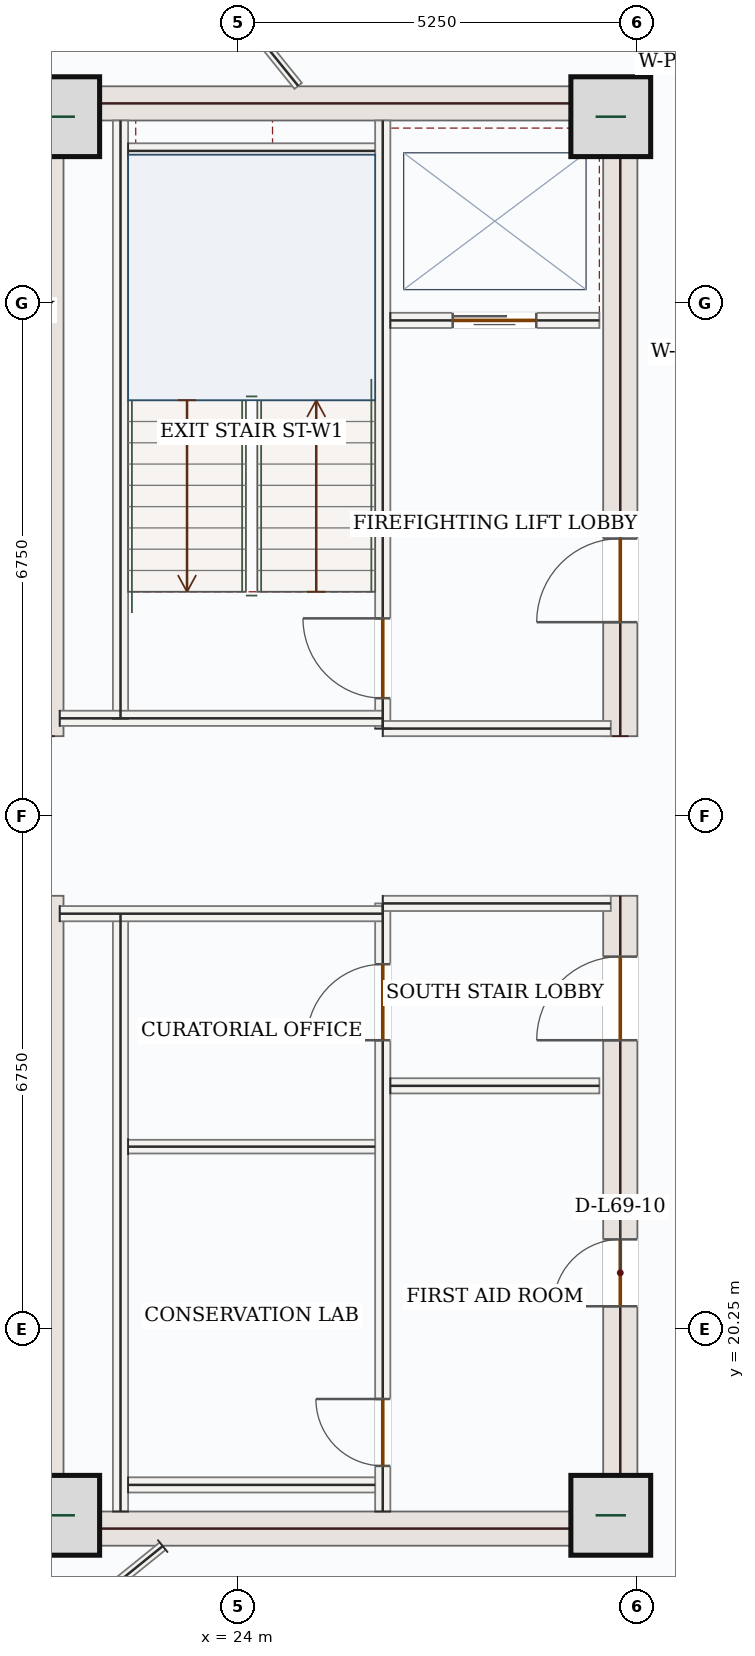
"""IFC4 building model, lengths in metres.
Left out: names, types, materials, properties, quantities, classifications, styles, units other than length and angle.
Written with IfcOpenShell. Run it as: python <this file> out.ifc"""

import sys

from ifc_helpers import new_model, si_unit, direction, frame, frame_2d, origin, origin_2d, place, context, subcontext, project, spatial, rectangle, extrude, source, transform, mapped, element, fill, save


model = new_model("IFC4")
c1 = context("Model", 3, precision=1e-05, world=origin(), true_north=direction((0.0, 1.0)))
c2 = subcontext(c1, "Body", "Model", "MODEL_VIEW")
j1 = project(units=[si_unit("LENGTHUNIT", "METRE"), si_unit("PLANEANGLEUNIT", "RADIAN")], contexts=[c1])
p1 = place(None, origin())
s1 = spatial("IfcSite", under=j1, at=p1, CompositionType="ELEMENT")
p2 = place(p1, origin())
s2 = spatial("IfcBuilding", under=s1, at=p2, CompositionType="ELEMENT")
p3 = place(p2, frame((0.0, 0.0, 287.85)))
s3 = spatial("IfcBuildingStorey", under=s2, at=p3, CompositionType="ELEMENT", Elevation=287.85)
m1 = source(origin(), c2, "Body", "SweptSolid", [
    extrude(rectangle(XDim=8.55, YDim=0.45, at=frame_2d((4.275, 0.0))), origin(), (0.0, 0.0, 1.0), 3.5),
])
for number, where, z_axis, x_axis in (
    (1, (21.475, 17.4, 0.0), (0.0, 0.0, 1.0), (0.0, 1.0, 0.0)),
    (2, (21.475, 28.05, 0.0), (0.0, 0.0, 1.0), (0.0, 1.0, 0.0)),
):
    element("IfcWall", number, at=place(p3, frame(where, z_axis=z_axis, x_axis=x_axis)), inside=s3, PredefinedType="SHEAR", context=c2, shape_type="MappedRepresentation", body=[
        mapped(m1, transform((0.0, 0.0, 0.0), x_axis=(1.0, 0.0, 0.0), y_axis=(0.0, 1.0, 0.0), z_axis=(0.0, 0.0, 1.0), scale=1.0)),
    ])
p4 = place(p3, frame((29.025, 17.4, 0.0), z_axis=(0.0, 0.0, 1.0), x_axis=(0.0, 1.0, 0.0)))
e3 = element("IfcWall", 3, at=p4, inside=s3, PredefinedType="SHEAR", context=c2, shape_type="SweptSolid", body=[
    extrude(rectangle(XDim=8.55, YDim=0.45, at=frame_2d((4.275, 0.0))), origin(), (0.0, 0.0, 1.0), 3.5),
])
p5 = place(p4, frame((6.65, 0.0, 0.0)))
e4 = element("IfcOpeningElement", 4, at=p5, cuts=e3, PredefinedType="OPENING", context=c2, shape_type="SweptSolid", body=[
    extrude(rectangle(XDim=1.1, YDim=2.2, at=frame_2d((0.55, 1.1))), frame((0.0, 0.235, 0.0), z_axis=(0.0, -1.0, 0.0), x_axis=(1.0, 0.0, 0.0)), (0.0, 0.0, 1.0), 0.47),
])
p6 = place(p4, frame((3.15, 0.0, 0.0)))
e5 = element("IfcOpeningElement", 5, at=p6, cuts=e3, PredefinedType="OPENING", context=c2, shape_type="SweptSolid", body=[
    extrude(rectangle(XDim=0.88, YDim=2.1, at=frame_2d((0.44, 1.05))), frame((0.0, 0.235, 0.0), z_axis=(0.0, -1.0, 0.0), x_axis=(1.0, 0.0, 0.0)), (0.0, 0.0, 1.0), 0.47),
])
p7 = place(p3, frame((29.025, 28.05, 0.0), z_axis=(0.0, 0.0, 1.0), x_axis=(0.0, 1.0, 0.0)))
e6 = element("IfcWall", 6, at=p7, inside=s3, PredefinedType="SHEAR", context=c2, shape_type="SweptSolid", body=[
    extrude(rectangle(XDim=8.55, YDim=0.45, at=frame_2d((4.275, 0.0))), origin(), (0.0, 0.0, 1.0), 3.5),
])
p8 = place(p7, frame((1.5, 0.0, 0.0)))
e7 = element("IfcOpeningElement", 7, at=p8, cuts=e6, PredefinedType="OPENING", context=c2, shape_type="SweptSolid", body=[
    extrude(rectangle(XDim=1.1, YDim=2.2, at=frame_2d((0.55, 1.1))), frame((0.0, 0.235, 0.0), z_axis=(0.0, -1.0, 0.0), x_axis=(1.0, 0.0, 0.0)), (0.0, 0.0, 1.0), 0.47),
])
m2 = source(origin(), c2, "Body", "SweptSolid", [
    extrude(rectangle(XDim=7.1, YDim=0.45, at=frame_2d((3.55, 0.0))), origin(), (0.0, 0.0, 1.0), 3.5),
])
for number, where, z_axis, x_axis in (
    (8, (21.7, 17.625, 0.0), (0.0, 0.0, 1.0), (1.0, 0.0, 0.0)),
    (9, (21.7, 36.375, 0.0), (0.0, 0.0, 1.0), (1.0, 0.0, 0.0)),
):
    element("IfcWall", number, at=place(p3, frame(where, z_axis=z_axis, x_axis=x_axis)), inside=s3, PredefinedType="SHEAR", context=c2, shape_type="MappedRepresentation", body=[
        mapped(m2, transform((0.0, 0.0, 0.0), x_axis=(1.0, 0.0, 0.0), y_axis=(0.0, 1.0, 0.0), z_axis=(0.0, 0.0, 1.0), scale=1.0)),
    ])
m3 = source(origin(), c2, "Body", "SweptSolid", [
    extrude(rectangle(XDim=1.05, YDim=1.05, at=origin_2d()), origin(), (0.0, 0.0, 1.0), 3.75),
])
for number, where, z_axis, x_axis in (
    (10, (21.65, 17.8, 0.0), (0.0, 0.0, 1.0), (1.0, 0.0, 0.0)),
    (11, (28.9, 17.8, 0.0), (0.0, 0.0, 1.0), (1.0, 0.0, 0.0)),
    (12, (21.65, 36.2, 0.0), (0.0, 0.0, 1.0), (1.0, 0.0, 0.0)),
    (13, (28.9, 36.2, 0.0), (0.0, 0.0, 1.0), (1.0, 0.0, 0.0)),
):
    element("IfcColumn", number, at=place(p3, frame(where, z_axis=z_axis, x_axis=x_axis)), inside=s3, PredefinedType="COLUMN", context=c2, shape_type="MappedRepresentation", body=[
        mapped(m3, transform((0.0, 0.0, 0.0), x_axis=(1.0, 0.0, 0.0), y_axis=(0.0, 1.0, 0.0), z_axis=(0.0, 0.0, 1.0), scale=1.0)),
    ])
m4 = source(origin(), c2, "Body", "SweptSolid", [
    extrude(rectangle(XDim=3.96, YDim=0.28, at=frame_2d((1.98, 0.0))), origin(), (0.0, 0.0, 1.0), 3.5),
])
p9 = place(p3, frame((21.74, 15.658, 0.0), z_axis=(0.0, 0.0, 1.0), x_axis=(-0.707106781187, 0.707106781187, 0.0)))
e14 = element("IfcWall", 14, at=p9, inside=s3, PredefinedType="SOLIDWALL", context=c2, shape_type="MappedRepresentation", body=[
    mapped(m4, transform((0.0, 0.0, 0.0), x_axis=(1.0, 0.0, 0.0), y_axis=(0.0, 1.0, 0.0), z_axis=(0.0, 0.0, 1.0), scale=1.0)),
])
m5 = source(origin(), c2, "Body", "SweptSolid", [
    extrude(rectangle(XDim=7.87, YDim=0.2, at=frame_2d((3.935, 0.0))), origin(), (0.0, 0.0, 1.0), 3.5),
])
for number, where, z_axis, x_axis in (
    (15, (22.45, 17.85, 0.0), (0.0, 0.0, 1.0), (0.0, 1.0, 0.0)),
    (16, (22.45, 28.28, 0.0), (0.0, 0.0, 1.0), (0.0, 1.0, 0.0)),
):
    element("IfcWall", number, at=place(p3, frame(where, z_axis=z_axis, x_axis=x_axis)), inside=s3, PredefinedType="SOLIDWALL", context=c2, shape_type="MappedRepresentation", body=[
        mapped(m5, transform((0.0, 0.0, 0.0), x_axis=(1.0, 0.0, 0.0), y_axis=(0.0, 1.0, 0.0), z_axis=(0.0, 0.0, 1.0), scale=1.0)),
    ])
p10 = place(p3, frame((25.9, 17.85, 0.0), z_axis=(0.0, 0.0, 1.0), x_axis=(0.0, 1.0, 0.0)))
e17 = element("IfcWall", 17, at=p10, inside=s3, PredefinedType="SOLIDWALL", context=c2, shape_type="SweptSolid", body=[
    extrude(rectangle(XDim=8.0, YDim=0.2, at=frame_2d((4.0, 0.0))), origin(), (0.0, 0.0, 1.0), 3.5),
])
p11 = place(p10, frame((6.2, 0.0, 0.0)))
e18 = element("IfcOpeningElement", 18, at=p11, cuts=e17, PredefinedType="OPENING", context=c2, shape_type="SweptSolid", body=[
    extrude(rectangle(XDim=1.0, YDim=2.15, at=frame_2d((0.5, 1.075))), frame((0.0, 0.11, 0.0), z_axis=(0.0, -1.0, 0.0), x_axis=(1.0, 0.0, 0.0)), (0.0, 0.0, 1.0), 0.22),
])
p12 = place(p10, frame((0.6, 0.0, 0.0)))
e19 = element("IfcOpeningElement", 19, at=p12, cuts=e17, PredefinedType="OPENING", context=c2, shape_type="SweptSolid", body=[
    extrude(rectangle(XDim=0.88, YDim=2.1, at=frame_2d((0.44, 1.05))), frame((0.0, 0.11, 0.0), z_axis=(0.0, -1.0, 0.0), x_axis=(1.0, 0.0, 0.0)), (0.0, 0.0, 1.0), 0.22),
])
p13 = place(p3, frame((25.9, 28.15, 0.0), z_axis=(0.0, 0.0, 1.0), x_axis=(0.0, 1.0, 0.0)))
e20 = element("IfcWall", 20, at=p13, inside=s3, PredefinedType="SOLIDWALL", context=c2, shape_type="SweptSolid", body=[
    extrude(rectangle(XDim=8.0, YDim=0.2, at=frame_2d((4.0, 0.0))), origin(), (0.0, 0.0, 1.0), 3.5),
])
p14 = place(p13, frame((0.4, 0.0, 0.0)))
e21 = element("IfcOpeningElement", 21, at=p14, cuts=e20, PredefinedType="OPENING", context=c2, shape_type="SweptSolid", body=[
    extrude(rectangle(XDim=1.05, YDim=2.15, at=frame_2d((0.525, 1.075))), frame((0.0, 0.11, 0.0), z_axis=(0.0, -1.0, 0.0), x_axis=(1.0, 0.0, 0.0)), (0.0, 0.0, 1.0), 0.22),
])
m6 = source(origin(), c2, "Body", "SweptSolid", [
    extrude(rectangle(XDim=4.25, YDim=0.2, at=frame_2d((2.125, 0.0))), origin(), (0.0, 0.0, 1.0), 3.5),
])
p15 = place(p3, frame((21.65, 25.715, 0.0), z_axis=(0.0, 0.0, 1.0), x_axis=(1.0, 0.0, 0.0)))
e22 = element("IfcWall", 22, at=p15, inside=s3, PredefinedType="SOLIDWALL", context=c2, shape_type="MappedRepresentation", body=[
    mapped(m6, transform((0.0, 0.0, 0.0), x_axis=(1.0, 0.0, 0.0), y_axis=(0.0, 1.0, 0.0), z_axis=(0.0, 0.0, 1.0), scale=1.0)),
])
m7 = source(origin(), c2, "Body", "SweptSolid", [
    extrude(rectangle(XDim=3.0, YDim=0.2, at=frame_2d((1.5, 0.0))), origin(), (0.0, 0.0, 1.0), 3.5),
])
p16 = place(p3, frame((25.9, 25.85, 0.0), z_axis=(0.0, 0.0, 1.0), x_axis=(1.0, 0.0, 0.0)))
e23 = element("IfcWall", 23, at=p16, inside=s3, PredefinedType="SOLIDWALL", context=c2, shape_type="MappedRepresentation", body=[
    mapped(m7, transform((0.0, 0.0, 0.0), x_axis=(1.0, 0.0, 0.0), y_axis=(0.0, 1.0, 0.0), z_axis=(0.0, 0.0, 1.0), scale=1.0)),
])
p17 = place(p3, frame((21.65, 28.285, 0.0), z_axis=(0.0, 0.0, 1.0), x_axis=(1.0, 0.0, 0.0)))
e24 = element("IfcWall", 24, at=p17, inside=s3, PredefinedType="SOLIDWALL", context=c2, shape_type="MappedRepresentation", body=[
    mapped(m6, transform((0.0, 0.0, 0.0), x_axis=(1.0, 0.0, 0.0), y_axis=(0.0, 1.0, 0.0), z_axis=(0.0, 0.0, 1.0), scale=1.0)),
])
p18 = place(p3, frame((25.9, 28.15, 0.0), z_axis=(0.0, 0.0, 1.0), x_axis=(1.0, 0.0, 0.0)))
e25 = element("IfcWall", 25, at=p18, inside=s3, PredefinedType="SOLIDWALL", context=c2, shape_type="MappedRepresentation", body=[
    mapped(m7, transform((0.0, 0.0, 0.0), x_axis=(1.0, 0.0, 0.0), y_axis=(0.0, 1.0, 0.0), z_axis=(0.0, 0.0, 1.0), scale=1.0)),
])
m8 = source(origin(), c2, "Body", "SweptSolid", [
    extrude(rectangle(XDim=3.25, YDim=0.2, at=frame_2d((1.625, 0.0))), origin(), (0.0, 0.0, 1.0), 3.5),
])
for number, where, z_axis, x_axis in (
    (26, (22.55, 35.75, 0.0), (0.0, 0.0, 1.0), (1.0, 0.0, 0.0)),
    (27, (22.55, 18.2, 0.0), (0.0, 0.0, 1.0), (1.0, 0.0, 0.0)),
):
    element("IfcWall", number, at=place(p3, frame(where, z_axis=z_axis, x_axis=x_axis)), inside=s3, PredefinedType="SOLIDWALL", context=c2, shape_type="MappedRepresentation", body=[
        mapped(m8, transform((0.0, 0.0, 0.0), x_axis=(1.0, 0.0, 0.0), y_axis=(0.0, 1.0, 0.0), z_axis=(0.0, 0.0, 1.0), scale=1.0)),
    ])
m9 = source(origin(), c2, "Body", "SweptSolid", [
    extrude(rectangle(XDim=3.25, YDim=0.18, at=frame_2d((1.625, 0.0))), origin(), (0.0, 0.0, 1.0), 3.5),
])
p19 = place(p3, frame((22.55, 22.65, 0.0), z_axis=(0.0, 0.0, 1.0), x_axis=(1.0, 0.0, 0.0)))
e28 = element("IfcWall", 28, at=p19, inside=s3, PredefinedType="PARTITIONING", context=c2, shape_type="MappedRepresentation", body=[
    mapped(m9, transform((0.0, 0.0, 0.0), x_axis=(1.0, 0.0, 0.0), y_axis=(0.0, 1.0, 0.0), z_axis=(0.0, 0.0, 1.0), scale=1.0)),
])
p20 = place(p3, frame((26.0, 33.52, 0.0), z_axis=(0.0, 0.0, 1.0), x_axis=(1.0, 0.0, 0.0)))
e29 = element("IfcWall", 29, at=p20, inside=s3, PredefinedType="SOLIDWALL", context=c2, shape_type="SweptSolid", body=[
    extrude(rectangle(XDim=2.75, YDim=0.2, at=frame_2d((1.375, 0.0))), origin(), (0.0, 0.0, 1.0), 3.5),
])
p21 = place(p20, frame((0.82, 0.0, 0.0)))
e30 = element("IfcOpeningElement", 30, at=p21, cuts=e29, PredefinedType="OPENING", context=c2, shape_type="SweptSolid", body=[
    extrude(rectangle(XDim=1.1, YDim=2.15, at=frame_2d((0.55, 1.075))), frame((0.0, 0.11, 0.0), z_axis=(0.0, -1.0, 0.0), x_axis=(1.0, 0.0, 0.0)), (0.0, 0.0, 1.0), 0.22),
])
m10 = source(origin(), c2, "Body", "SweptSolid", [
    extrude(rectangle(XDim=2.75, YDim=0.2, at=frame_2d((1.375, 0.0))), origin(), (0.0, 0.0, 1.0), 3.5),
])
p22 = place(p3, frame((26.0, 23.45, 0.0), z_axis=(0.0, 0.0, 1.0), x_axis=(1.0, 0.0, 0.0)))
e31 = element("IfcWall", 31, at=p22, inside=s3, PredefinedType="SOLIDWALL", context=c2, shape_type="MappedRepresentation", body=[
    mapped(m10, transform((0.0, 0.0, 0.0), x_axis=(1.0, 0.0, 0.0), y_axis=(0.0, 1.0, 0.0), z_axis=(0.0, 0.0, 1.0), scale=1.0)),
])
m11 = source(origin(), c2, "Body", "SweptSolid", [
    extrude(rectangle(XDim=1.989, YDim=0.125, at=frame_2d((0.995, 0.0))), origin(), (0.0, 0.0, 1.0), 3.5),
])
p23 = place(p3, frame((23.005, 17.395, 0.0), z_axis=(0.0, 0.0, 1.0), x_axis=(-0.778058853423, -0.628191388519, 0.0)))
e32 = element("IfcWall", 32, at=p23, inside=s3, PredefinedType="PARTITIONING", context=c2, shape_type="MappedRepresentation", body=[
    mapped(m11, transform((0.0, 0.0, 0.0), x_axis=(1.0, 0.0, 0.0), y_axis=(0.0, 1.0, 0.0), z_axis=(0.0, 0.0, 1.0), scale=1.0)),
])
m12 = source(origin(), c2, "Body", "SweptSolid", [
    extrude(rectangle(XDim=2.089, YDim=0.125, at=frame_2d((1.045, 0.0))), origin(), (0.0, 0.0, 1.0), 3.5),
])
p24 = place(p3, frame((23.475, 38.231, 0.0), z_axis=(0.0, 0.0, 1.0), x_axis=(0.628165745158, -0.778079556735, 0.0)))
e33 = element("IfcWall", 33, at=p24, inside=s3, PredefinedType="PARTITIONING", context=c2, shape_type="MappedRepresentation", body=[
    mapped(m12, transform((0.0, 0.0, 0.0), x_axis=(1.0, 0.0, 0.0), y_axis=(0.0, 1.0, 0.0), z_axis=(0.0, 0.0, 1.0), scale=1.0)),
])
m13 = source(origin(), c2, "Body", "SweptSolid", [
    extrude(rectangle(XDim=1.05, YDim=2.15, at=frame_2d((0.525, 1.075))), frame((0.0, 0.025, 0.0), z_axis=(0.0, -1.0, 0.0), x_axis=(1.0, 0.0, 0.0)), (0.0, 0.0, 1.0), 0.05),
])
p25 = place(p14, origin())
e34 = element("IfcDoor", 34, at=p25, inside=s3, OperationType="SINGLE_SWING_RIGHT", PredefinedType="DOOR", context=c2, shape_type="MappedRepresentation", body=[
    mapped(m13, transform((0.0, 0.0, 0.0), x_axis=(1.0, 0.0, 0.0), y_axis=(0.0, 1.0, 0.0), z_axis=(0.0, 0.0, 1.0), scale=1.0)),
])
fill(e21, e34)
m14 = source(origin(), c2, "Body", "SweptSolid", [
    extrude(rectangle(XDim=1.0, YDim=2.15, at=frame_2d((0.5, 1.075))), frame((0.0, 0.025, 0.0), z_axis=(0.0, -1.0, 0.0), x_axis=(1.0, 0.0, 0.0)), (0.0, 0.0, 1.0), 0.05),
])
p26 = place(p11, origin())
e35 = element("IfcDoor", 35, at=p26, inside=s3, OperationType="SINGLE_SWING_LEFT", PredefinedType="DOOR", context=c2, shape_type="MappedRepresentation", body=[
    mapped(m14, transform((0.0, 0.0, 0.0), x_axis=(1.0, 0.0, 0.0), y_axis=(0.0, 1.0, 0.0), z_axis=(0.0, 0.0, 1.0), scale=1.0)),
])
fill(e18, e35)
m15 = source(origin(), c2, "Body", "SweptSolid", [
    extrude(rectangle(XDim=0.88, YDim=2.1, at=frame_2d((0.44, 1.05))), frame((0.0, 0.025, 0.0), z_axis=(0.0, -1.0, 0.0), x_axis=(1.0, 0.0, 0.0)), (0.0, 0.0, 1.0), 0.05),
])
p27 = place(p12, origin())
e36 = element("IfcDoor", 36, at=p27, inside=s3, OperationType="SINGLE_SWING_RIGHT", PredefinedType="DOOR", context=c2, shape_type="MappedRepresentation", body=[
    mapped(m15, transform((0.0, 0.0, 0.0), x_axis=(1.0, 0.0, 0.0), y_axis=(0.0, 1.0, 0.0), z_axis=(0.0, 0.0, 1.0), scale=1.0)),
])
fill(e19, e36)
m16 = source(origin(), c2, "Body", "SweptSolid", [
    extrude(rectangle(XDim=1.1, YDim=2.15, at=frame_2d((0.55, 1.075))), frame((0.0, 0.025, 0.0), z_axis=(0.0, -1.0, 0.0), x_axis=(1.0, 0.0, 0.0)), (0.0, 0.0, 1.0), 0.05),
])
p28 = place(p21, origin())
e37 = element("IfcDoor", 37, at=p28, inside=s3, OperationType="DOUBLE_DOOR_SLIDING", PredefinedType="DOOR", context=c2, shape_type="MappedRepresentation", body=[
    mapped(m16, transform((0.0, 0.0, 0.0), x_axis=(1.0, 0.0, 0.0), y_axis=(0.0, 1.0, 0.0), z_axis=(0.0, 0.0, 1.0), scale=1.0)),
])
fill(e30, e37)
m17 = source(origin(), c2, "Body", "SweptSolid", [
    extrude(rectangle(XDim=1.1, YDim=2.2, at=frame_2d((0.55, 1.1))), frame((0.0, 0.025, 0.0), z_axis=(0.0, -1.0, 0.0), x_axis=(1.0, 0.0, 0.0)), (0.0, 0.0, 1.0), 0.05),
])
p29 = place(p8, origin())
e38 = element("IfcDoor", 38, at=p29, inside=s3, OperationType="SINGLE_SWING_LEFT", PredefinedType="DOOR", context=c2, shape_type="MappedRepresentation", body=[
    mapped(m17, transform((0.0, 0.0, 0.0), x_axis=(1.0, 0.0, 0.0), y_axis=(0.0, 1.0, 0.0), z_axis=(0.0, 0.0, 1.0), scale=1.0)),
])
fill(e7, e38)
p30 = place(p5, origin())
e39 = element("IfcDoor", 39, at=p30, inside=s3, OperationType="SINGLE_SWING_LEFT", PredefinedType="DOOR", context=c2, shape_type="MappedRepresentation", body=[
    mapped(m17, transform((0.0, 0.0, 0.0), x_axis=(1.0, 0.0, 0.0), y_axis=(0.0, 1.0, 0.0), z_axis=(0.0, 0.0, 1.0), scale=1.0)),
])
fill(e4, e39)
p31 = place(p6, origin())
e40 = element("IfcDoor", 40, at=p31, inside=s3, OperationType="SINGLE_SWING_LEFT", PredefinedType="DOOR", context=c2, shape_type="MappedRepresentation", body=[
    mapped(m15, transform((0.0, 0.0, 0.0), x_axis=(1.0, 0.0, 0.0), y_axis=(0.0, 1.0, 0.0), z_axis=(0.0, 0.0, 1.0), scale=1.0)),
])
fill(e5, e40)
save(model, sys.argv[1])
